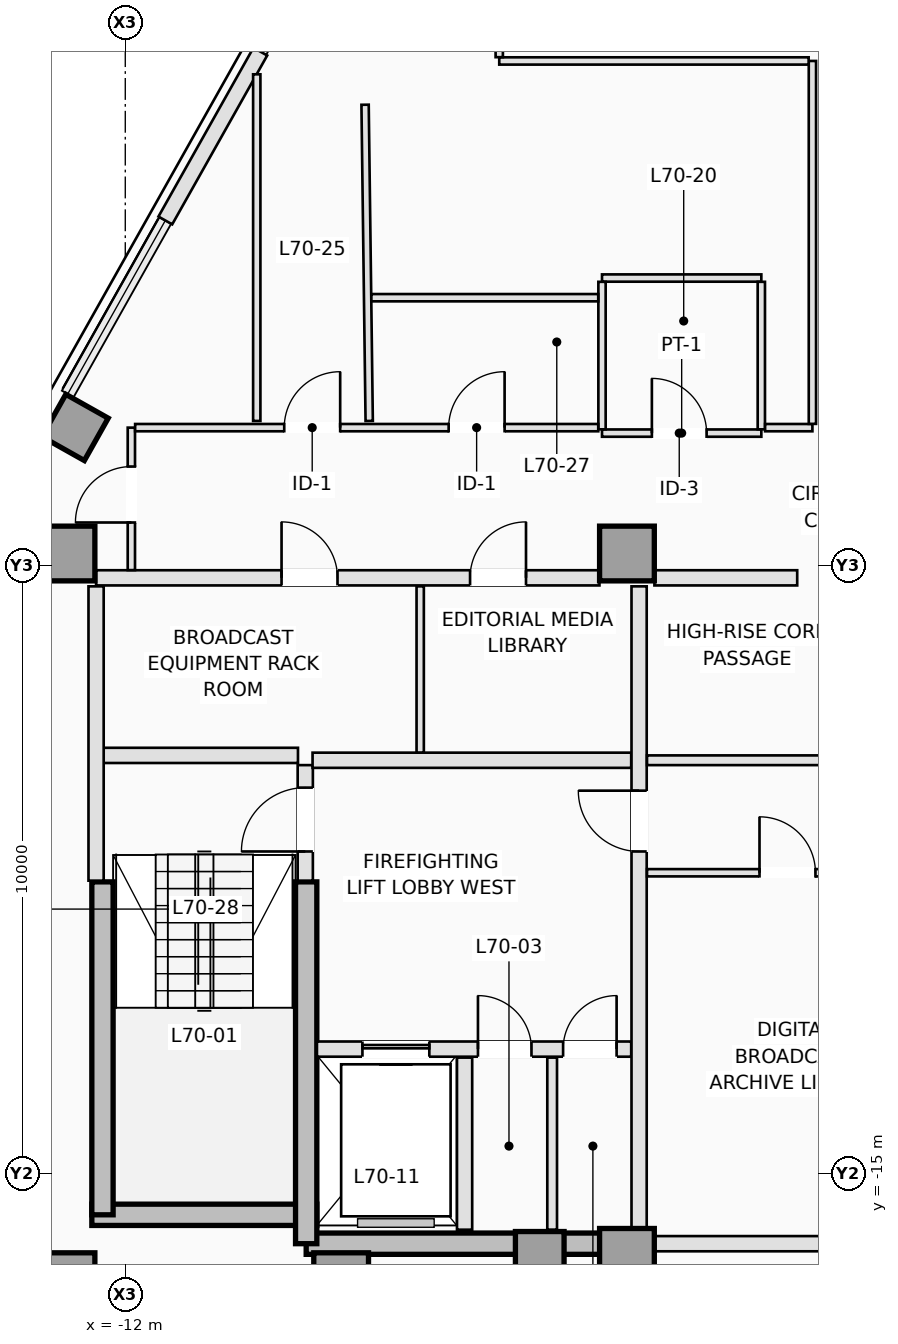
"""IFC4 building model, lengths in metres.
Left out: names, types, materials, properties, quantities, classifications, styles, units other than length and angle.
Written with IfcOpenShell. Run it as: python <this file> out.ifc"""

import sys

from ifc_helpers import new_model, si_unit, direction, frame, frame_2d, origin, origin_2d, place, context, subcontext, project, spatial, rectangle, extrude, element, fill, save


model = new_model("IFC4")
c1 = context("Model", 3, precision=1e-05, world=origin(), true_north=direction((0.0, 1.0)))
c2 = subcontext(c1, "Body", "Model", "MODEL_VIEW")
j1 = project(units=[si_unit("LENGTHUNIT", "METRE"), si_unit("PLANEANGLEUNIT", "RADIAN")], contexts=[c1])
p1 = place(None, origin())
s1 = spatial("IfcSite", under=j1, at=p1, CompositionType="ELEMENT")
p2 = place(p1, origin())
s2 = spatial("IfcBuilding", under=s1, at=p2, CompositionType="ELEMENT")
p3 = place(p2, frame((0.0, 0.0, 253.4)))
s3 = spatial("IfcBuildingStorey", under=s2, at=p3, CompositionType="ELEMENT", Elevation=253.4)
p4 = place(p3, frame((-12.55, -15.675, 0.0), z_axis=(0.0, 0.0, 1.0), x_axis=(1.0, 0.0, 0.0)))
e1 = element("IfcWall", 1, at=p4, inside=s3, PredefinedType="SHEAR", context=c2, shape_type="SweptSolid", body=[
    extrude(rectangle(XDim=3.7, YDim=0.35, at=frame_2d((1.85, 0.0))), origin(), (0.0, 0.0, 1.0), 3.5),
])
p5 = place(p3, frame((-9.025, -16.15, 0.0), z_axis=(0.0, 0.0, 1.0), x_axis=(1.0, 0.0, 0.0)))
e2 = element("IfcWall", 2, at=p5, inside=s3, PredefinedType="SHEAR", context=c2, shape_type="SweptSolid", body=[
    extrude(rectangle(XDim=5.275, YDim=0.35, at=frame_2d((2.637, 0.0))), origin(), (0.0, 0.0, 1.0), 3.5),
])
p6 = place(p3, frame((-12.375, -15.675, 0.0), z_axis=(0.0, 0.0, 1.0), x_axis=(0.0, 1.0, 0.0)))
e3 = element("IfcWall", 3, at=p6, inside=s3, PredefinedType="SHEAR", context=c2, shape_type="SweptSolid", body=[
    extrude(rectangle(XDim=5.475, YDim=0.35, at=frame_2d((2.738, 0.0))), origin(), (0.0, 0.0, 1.0), 3.5),
])
p7 = place(p3, frame((-9.025, -16.15, 0.0), z_axis=(0.0, 0.0, 1.0), x_axis=(0.0, 1.0, 0.0)))
e4 = element("IfcWall", 4, at=p7, inside=s3, PredefinedType="SHEAR", context=c2, shape_type="SweptSolid", body=[
    extrude(rectangle(XDim=5.95, YDim=0.35, at=frame_2d((2.975, 0.0))), origin(), (0.0, 0.0, 1.0), 3.5),
])
for number, where, z_axis, x_axis in (
    (5, (-12.95, -16.75, 0.0), (0.0, 0.0, 1.0), (1.0, 0.0, 0.0)),
    (6, (-8.45, -16.75, 0.0), (0.0, 0.0, 1.0), (1.0, 0.0, 0.0)),
    (7, (-3.75, -16.35, 0.0), (0.0, 0.0, 1.0), (1.0, 0.0, 0.0)),
    (8, (-12.95, -4.8, 0.0), (0.0, 0.0, 1.0), (1.0, 0.0, 0.0)),
    (9, (-3.75, -4.8, 0.0), (0.0, 0.0, 1.0), (1.0, 0.0, 0.0)),
):
    element("IfcColumn", number, at=place(p3, frame(where, z_axis=z_axis, x_axis=x_axis)), inside=s3, PredefinedType="COLUMN", context=c2, shape_type="SweptSolid", body=[
        extrude(rectangle(XDim=0.9, YDim=0.9, at=origin_2d()), origin(), (0.0, 0.0, 1.0), 3.5),
    ])
for number, where, z_axis, x_axis in (
    (10, (-5.184, -16.35, 0.0), (0.0, 0.0, 1.0), (0.0, 1.0, 0.0)),
    (11, (-12.825, -2.727, 0.0), (0.0, 0.0, 1.0), (-0.872, 0.49, 0.0)),
):
    element("IfcColumn", number, at=place(p3, frame(where, z_axis=z_axis, x_axis=x_axis)), inside=s3, PredefinedType="COLUMN", context=c2, shape_type="SweptSolid", body=[
        extrude(rectangle(XDim=0.8, YDim=0.8, at=origin_2d()), origin(), (0.0, 0.0, 1.0), 3.5),
    ])
p8 = place(p3, frame((-11.341, 0.677, 0.0), z_axis=(0.0, 0.0, 1.0), x_axis=(0.490268515903, 0.871571444182, 0.0)))
e12 = element("IfcWall", 12, at=p8, inside=s3, PredefinedType="STANDARD", context=c2, shape_type="SweptSolid", body=[
    extrude(rectangle(XDim=3.186, YDim=0.26, at=frame_2d((1.593, 0.0))), origin(), (0.0, 0.0, 1.0), 3.25),
])
p9 = place(p3, frame((-9.04, -10.18, 0.0), z_axis=(0.0, 0.0, 1.0), x_axis=(0.0, 1.0, 0.0)))
e13 = element("IfcWall", 13, at=p9, inside=s3, PredefinedType="PARTITIONING", context=c2, shape_type="SweptSolid", body=[
    extrude(rectangle(XDim=1.9, YDim=0.25, at=frame_2d((0.95, 0.0))), origin(), (0.0, 0.0, 1.0), 3.25),
])
p10 = place(p9, frame((0.48, 0.0, 0.0)))
e14 = element("IfcOpeningElement", 14, at=p10, cuts=e13, PredefinedType="OPENING", context=c2, shape_type="SweptSolid", body=[
    extrude(rectangle(XDim=1.05, YDim=2.15, at=frame_2d((0.525, 1.075))), frame((0.0, 0.135, 0.0), z_axis=(0.0, -1.0, 0.0), x_axis=(1.0, 0.0, 0.0)), (0.0, 0.0, 1.0), 0.27),
])
p11 = place(p3, frame((-12.38, -8.12, 0.0), z_axis=(0.0, 0.0, 1.0), x_axis=(1.0, 0.0, 0.0)))
e15 = element("IfcWall", 15, at=p11, inside=s3, PredefinedType="PARTITIONING", context=c2, shape_type="SweptSolid", body=[
    extrude(rectangle(XDim=3.22, YDim=0.25, at=frame_2d((1.61, 0.0))), origin(), (0.0, 0.0, 1.0), 3.25),
])
p12 = place(p3, frame((-12.48, -10.18, 0.0), z_axis=(0.0, 0.0, 1.0), x_axis=(0.0, 1.0, 0.0)))
e16 = element("IfcWall", 16, at=p12, inside=s3, PredefinedType="PARTITIONING", context=c2, shape_type="SweptSolid", body=[
    extrude(rectangle(XDim=4.84, YDim=0.25, at=frame_2d((2.42, 0.0))), origin(), (0.0, 0.0, 1.0), 3.25),
])
p13 = place(p3, frame((-8.848, -12.95, 0.0), z_axis=(0.0, 0.0, 1.0), x_axis=(1.0, 0.0, 0.0)))
e17 = element("IfcWall", 17, at=p13, inside=s3, PredefinedType="PARTITIONING", context=c2, shape_type="SweptSolid", body=[
    extrude(rectangle(XDim=5.168, YDim=0.25, at=frame_2d((2.584, 0.0))), origin(), (0.0, 0.0, 1.0), 3.25),
])
p14 = place(p13, frame((0.748, 0.0, 0.0)))
e18 = element("IfcOpeningElement", 18, at=p14, cuts=e17, PredefinedType="OPENING", context=c2, shape_type="SweptSolid", body=[
    extrude(rectangle(XDim=1.1, YDim=2.15, at=frame_2d((0.55, 1.075))), frame((0.0, 0.135, 0.0), z_axis=(0.0, -1.0, 0.0), x_axis=(1.0, 0.0, 0.0)), (0.0, 0.0, 1.0), 0.27),
])
p15 = place(p13, frame((2.648, 0.0, 0.0)))
e19 = element("IfcOpeningElement", 19, at=p15, cuts=e17, PredefinedType="OPENING", context=c2, shape_type="SweptSolid", body=[
    extrude(rectangle(XDim=0.88, YDim=2.1, at=frame_2d((0.44, 1.05))), frame((0.0, 0.135, 0.0), z_axis=(0.0, -1.0, 0.0), x_axis=(1.0, 0.0, 0.0)), (0.0, 0.0, 1.0), 0.27),
])
p16 = place(p13, frame((4.048, 0.0, 0.0)))
e20 = element("IfcOpeningElement", 20, at=p16, cuts=e17, PredefinedType="OPENING", context=c2, shape_type="SweptSolid", body=[
    extrude(rectangle(XDim=0.88, YDim=2.1, at=frame_2d((0.44, 1.05))), frame((0.0, 0.135, 0.0), z_axis=(0.0, -1.0, 0.0), x_axis=(1.0, 0.0, 0.0)), (0.0, 0.0, 1.0), 0.27),
])
p17 = place(p3, frame((-6.42, -15.92, 0.0), z_axis=(0.0, 0.0, 1.0), x_axis=(0.0, 1.0, 0.0)))
e21 = element("IfcWall", 21, at=p17, inside=s3, PredefinedType="PARTITIONING", context=c2, shape_type="SweptSolid", body=[
    extrude(rectangle(XDim=2.83, YDim=0.25, at=frame_2d((1.415, 0.0))), origin(), (0.0, 0.0, 1.0), 3.25),
])
p18 = place(p3, frame((-4.98, -15.92, 0.0), z_axis=(0.0, 0.0, 1.0), x_axis=(0.0, 1.0, 0.0)))
e22 = element("IfcWall", 22, at=p18, inside=s3, PredefinedType="PARTITIONING", context=c2, shape_type="SweptSolid", body=[
    extrude(rectangle(XDim=2.83, YDim=0.16, at=frame_2d((1.415, 0.0))), origin(), (0.0, 0.0, 1.0), 3.25),
])
p19 = place(p3, frame((-8.92, -8.2, 0.0), z_axis=(0.0, 0.0, 1.0), x_axis=(1.0, 0.0, 0.0)))
e23 = element("IfcWall", 23, at=p19, inside=s3, PredefinedType="PARTITIONING", context=c2, shape_type="SweptSolid", body=[
    extrude(rectangle(XDim=5.24, YDim=0.25, at=frame_2d((2.62, 0.0))), origin(), (0.0, 0.0, 1.0), 3.25),
])
p20 = place(p3, frame((-3.55, -15.898, 0.0), z_axis=(0.0, 0.0, 1.0), x_axis=(0.0, 1.0, 0.0)))
e24 = element("IfcWall", 24, at=p20, inside=s3, PredefinedType="PARTITIONING", context=c2, shape_type="SweptSolid", body=[
    extrude(rectangle(XDim=10.558, YDim=0.25, at=frame_2d((5.279, 0.0))), origin(), (0.0, 0.0, 1.0), 3.25),
])
p21 = place(p20, frame((6.198, 0.0, 0.0)))
e25 = element("IfcOpeningElement", 25, at=p21, cuts=e24, PredefinedType="OPENING", context=c2, shape_type="SweptSolid", body=[
    extrude(rectangle(XDim=1.0, YDim=2.15, at=frame_2d((0.5, 1.075))), frame((0.0, 0.135, 0.0), z_axis=(0.0, -1.0, 0.0), x_axis=(1.0, 0.0, 0.0)), (0.0, 0.0, 1.0), 0.27),
])
p22 = place(p3, frame((-12.48, -5.2, 0.0), z_axis=(0.0, 0.0, 1.0), x_axis=(1.0, 0.0, 0.0)))
e26 = element("IfcWall", 26, at=p22, inside=s3, PredefinedType="PARTITIONING", context=c2, shape_type="SweptSolid", body=[
    extrude(rectangle(XDim=8.278, YDim=0.25, at=frame_2d((4.139, 0.0))), origin(), (0.0, 0.0, 1.0), 3.25),
])
p23 = place(p22, frame((3.05, 0.0, 0.0)))
e27 = element("IfcOpeningElement", 27, at=p23, cuts=e26, PredefinedType="OPENING", context=c2, shape_type="SweptSolid", body=[
    extrude(rectangle(XDim=0.92, YDim=2.12, at=frame_2d((0.46, 1.06))), frame((0.0, 0.135, 0.0), z_axis=(0.0, -1.0, 0.0), x_axis=(1.0, 0.0, 0.0)), (0.0, 0.0, 1.0), 0.27),
])
p24 = place(p22, frame((6.15, 0.0, 0.0)))
e28 = element("IfcOpeningElement", 28, at=p24, cuts=e26, PredefinedType="OPENING", context=c2, shape_type="SweptSolid", body=[
    extrude(rectangle(XDim=0.92, YDim=2.12, at=frame_2d((0.46, 1.06))), frame((0.0, 0.135, 0.0), z_axis=(0.0, -1.0, 0.0), x_axis=(1.0, 0.0, 0.0)), (0.0, 0.0, 1.0), 0.27),
])
p25 = place(p3, frame((-3.298, -5.2, 0.0), z_axis=(0.0, 0.0, 1.0), x_axis=(1.0, 0.0, 0.0)))
e29 = element("IfcWall", 29, at=p25, inside=s3, PredefinedType="PARTITIONING", context=c2, shape_type="SweptSolid", body=[
    extrude(rectangle(XDim=2.348, YDim=0.25, at=frame_2d((1.174, 0.0))), origin(), (0.0, 0.0, 1.0), 3.25),
])
p26 = place(p3, frame((-7.15, -8.073, 0.0), z_axis=(0.0, 0.0, 1.0), x_axis=(0.0, 1.0, 0.0)))
e30 = element("IfcWall", 30, at=p26, inside=s3, PredefinedType="PARTITIONING", context=c2, shape_type="SweptSolid", body=[
    extrude(rectangle(XDim=2.733, YDim=0.12, at=frame_2d((1.366, 0.0))), origin(), (0.0, 0.0, 1.0), 3.25),
])
p27 = place(p3, frame((-3.298, -16.15, 0.0), z_axis=(0.0, 0.0, 1.0), x_axis=(1.0, 0.0, 0.0)))
e31 = element("IfcWall", 31, at=p27, inside=s3, PredefinedType="PARTITIONING", context=c2, shape_type="SweptSolid", body=[
    extrude(rectangle(XDim=6.596, YDim=0.25, at=frame_2d((3.298, 0.0))), origin(), (0.0, 0.0, 1.0), 2.844),
])
p28 = place(p3, frame((-3.42, -8.2, 0.0), z_axis=(0.0, 0.0, 1.0), x_axis=(1.0, 0.0, 0.0)))
e32 = element("IfcWall", 32, at=p28, inside=s3, PredefinedType="PARTITIONING", context=c2, shape_type="SweptSolid", body=[
    extrude(rectangle(XDim=6.84, YDim=0.16, at=frame_2d((3.42, 0.0))), origin(), (0.0, 0.0, 1.0), 3.25),
])
p29 = place(p28, frame((2.92, 0.0, 0.0)))
e33 = element("IfcOpeningElement", 33, at=p29, cuts=e32, PredefinedType="OPENING", context=c2, shape_type="SweptSolid", body=[
    extrude(rectangle(XDim=1.0, YDim=2.15, at=frame_2d((0.5, 1.075))), frame((0.0, 0.09, 0.0), z_axis=(0.0, -1.0, 0.0), x_axis=(1.0, 0.0, 0.0)), (0.0, 0.0, 1.0), 0.18),
])
p30 = place(p3, frame((-3.42, -10.05, 0.0), z_axis=(0.0, 0.0, 1.0), x_axis=(1.0, 0.0, 0.0)))
e34 = element("IfcWall", 34, at=p30, inside=s3, PredefinedType="PARTITIONING", context=c2, shape_type="SweptSolid", body=[
    extrude(rectangle(XDim=6.84, YDim=0.12, at=frame_2d((3.42, 0.0))), origin(), (0.0, 0.0, 1.0), 3.25),
])
p31 = place(p30, frame((1.85, 0.0, 0.0)))
e35 = element("IfcOpeningElement", 35, at=p31, cuts=e34, PredefinedType="OPENING", context=c2, shape_type="SweptSolid", body=[
    extrude(rectangle(XDim=0.92, YDim=2.12, at=frame_2d((0.46, 1.06))), frame((0.0, 0.07, 0.0), z_axis=(0.0, -1.0, 0.0), x_axis=(1.0, 0.0, 0.0)), (0.0, 0.0, 1.0), 0.14),
])
p32 = place(p30, frame((5.35, 0.0, 0.0)))
e36 = element("IfcOpeningElement", 36, at=p32, cuts=e34, PredefinedType="OPENING", context=c2, shape_type="SweptSolid", body=[
    extrude(rectangle(XDim=0.88, YDim=2.12, at=frame_2d((0.44, 1.06))), frame((0.0, 0.07, 0.0), z_axis=(0.0, -1.0, 0.0), x_axis=(1.0, 0.0, 0.0)), (0.0, 0.0, 1.0), 0.14),
])
p33 = place(p3, frame((-4.16, -2.82, 0.0), z_axis=(0.0, 0.0, 1.0), x_axis=(1.0, 0.0, 0.0)))
e37 = element("IfcWall", 37, at=p33, inside=s3, PredefinedType="PARTITIONING", context=c2, shape_type="SweptSolid", body=[
    extrude(rectangle(XDim=2.62, YDim=0.12, at=frame_2d((1.31, 0.0))), origin(), (0.0, 0.0, 1.0), 2.943),
])
p34 = place(p33, frame((0.82, 0.0, 0.0)))
e38 = element("IfcOpeningElement", 38, at=p34, cuts=e37, PredefinedType="OPENING", context=c2, shape_type="SweptSolid", body=[
    extrude(rectangle(XDim=0.9, YDim=2.12, at=frame_2d((0.45, 1.06))), frame((0.0, 0.07, 0.0), z_axis=(0.0, -1.0, 0.0), x_axis=(1.0, 0.0, 0.0)), (0.0, 0.0, 1.0), 0.14),
])
p35 = place(p3, frame((-4.16, -0.27, 0.0), z_axis=(0.0, 0.0, 1.0), x_axis=(1.0, 0.0, 0.0)))
e39 = element("IfcWall", 39, at=p35, inside=s3, PredefinedType="PARTITIONING", context=c2, shape_type="SweptSolid", body=[
    extrude(rectangle(XDim=2.62, YDim=0.12, at=frame_2d((1.31, 0.0))), origin(), (0.0, 0.0, 1.0), 3.25),
])
for number, where, z_axis, x_axis in (
    (40, (-4.16, -2.758, 0.0), (0.0, 0.0, 1.0), (0.0, 1.0, 0.0)),
    (41, (-1.54, -2.758, 0.0), (0.0, 0.0, 1.0), (0.0, 1.0, 0.0)),
):
    element("IfcWall", number, at=place(p3, frame(where, z_axis=z_axis, x_axis=x_axis)), inside=s3, PredefinedType="PARTITIONING", context=c2, shape_type="SweptSolid", body=[
        extrude(rectangle(XDim=2.426, YDim=0.12, at=frame_2d((1.213, 0.0))), origin(), (0.0, 0.0, 1.0), 3.25),
    ])
p36 = place(p3, frame((-11.9, -5.073, 0.0), z_axis=(0.0, 0.0, 1.0), x_axis=(0.0, 1.0, 0.0)))
e42 = element("IfcWall", 42, at=p36, inside=s3, PredefinedType="PARTITIONING", context=c2, shape_type="SweptSolid", body=[
    extrude(rectangle(XDim=2.343, YDim=0.12, at=frame_2d((1.171, 0.0))), origin(), (0.0, 0.0, 1.0), 3.25),
])
p37 = place(p36, frame((0.783, 0.0, 0.0)))
e43 = element("IfcOpeningElement", 43, at=p37, cuts=e42, PredefinedType="OPENING", context=c2, shape_type="SweptSolid", body=[
    extrude(rectangle(XDim=0.92, YDim=2.12, at=frame_2d((0.46, 1.06))), frame((0.0, 0.07, 0.0), z_axis=(0.0, -1.0, 0.0), x_axis=(1.0, 0.0, 0.0)), (0.0, 0.0, 1.0), 0.14),
])
p38 = place(p3, frame((-11.838, -2.73, 0.0), z_axis=(0.0, 0.0, 1.0), x_axis=(1.0, 0.0, 0.0)))
e44 = element("IfcWall", 44, at=p38, inside=s3, PredefinedType="PARTITIONING", context=c2, shape_type="SweptSolid", body=[
    extrude(rectangle(XDim=7.616, YDim=0.12, at=frame_2d((3.808, 0.0))), origin(), (0.0, 0.0, 1.0), 3.25),
])
p39 = place(p38, frame((2.452, 0.0, 0.0)))
e45 = element("IfcOpeningElement", 45, at=p39, cuts=e44, PredefinedType="OPENING", context=c2, shape_type="SweptSolid", body=[
    extrude(rectangle(XDim=0.92, YDim=2.12, at=frame_2d((0.46, 1.06))), frame((0.0, 0.07, 0.0), z_axis=(0.0, -1.0, 0.0), x_axis=(1.0, 0.0, 0.0)), (0.0, 0.0, 1.0), 0.14),
])
p40 = place(p38, frame((5.156, 0.0, 0.0)))
e46 = element("IfcOpeningElement", 46, at=p40, cuts=e44, PredefinedType="OPENING", context=c2, shape_type="SweptSolid", body=[
    extrude(rectangle(XDim=0.92, YDim=2.12, at=frame_2d((0.46, 1.06))), frame((0.0, 0.07, 0.0), z_axis=(0.0, -1.0, 0.0), x_axis=(1.0, 0.0, 0.0)), (0.0, 0.0, 1.0), 0.14),
])
p41 = place(p3, frame((-1.478, -2.73, 0.0), z_axis=(0.0, 0.0, 1.0), x_axis=(1.0, 0.0, 0.0)))
e47 = element("IfcWall", 47, at=p41, inside=s3, PredefinedType="PARTITIONING", context=c2, shape_type="SweptSolid", body=[
    extrude(rectangle(XDim=0.778, YDim=0.12, at=frame_2d((0.389, 0.0))), origin(), (0.0, 0.0, 1.0), 2.943),
])
p42 = place(p3, frame((-0.7, -2.668, 0.0), z_axis=(0.0, 0.0, 1.0), x_axis=(0.0, 1.0, 0.0)))
e48 = element("IfcWall", 48, at=p42, inside=s3, PredefinedType="PARTITIONING", context=c2, shape_type="SweptSolid", body=[
    extrude(rectangle(XDim=5.968, YDim=0.12, at=frame_2d((2.984, 0.0))), origin(), (0.0, 0.0, 1.0), 3.25),
])
p43 = place(p3, frame((-0.762, 3.3, 0.0), z_axis=(0.0, 0.0, 1.0), x_axis=(-1.0, 0.0, 0.0)))
e49 = element("IfcWall", 49, at=p43, inside=s3, PredefinedType="PARTITIONING", context=c2, shape_type="SweptSolid", body=[
    extrude(rectangle(XDim=5.088, YDim=0.12, at=frame_2d((2.544, 0.0))), origin(), (0.0, 0.0, 1.0), 3.25),
])
p44 = place(p3, frame((-5.85, 3.362, 0.0), z_axis=(0.0, 0.0, 1.0), x_axis=(0.0, 1.0, 0.0)))
e50 = element("IfcWall", 50, at=p44, inside=s3, PredefinedType="PARTITIONING", context=c2, shape_type="SweptSolid", body=[
    extrude(rectangle(XDim=1.488, YDim=0.12, at=frame_2d((0.744, 0.0))), origin(), (0.0, 0.0, 1.0), 3.25),
])
p45 = place(p3, frame((-7.989, -2.62, 0.0), z_axis=(0.0, 0.0, 1.0), x_axis=(-0.013050531691, 0.999914838185, 0.0)))
e51 = element("IfcWall", 51, at=p45, inside=s3, PredefinedType="PARTITIONING", context=c2, shape_type="SweptSolid", body=[
    extrude(rectangle(XDim=5.201, YDim=0.12, at=frame_2d((2.6, 0.0))), origin(), (0.0, 0.0, 1.0), 3.25),
])
p46 = place(p3, frame((-4.222, -0.593, 0.0), z_axis=(0.0, 0.0, 1.0), x_axis=(-1.0, 0.0, 0.0)))
e52 = element("IfcWall", 52, at=p46, inside=s3, PredefinedType="PARTITIONING", context=c2, shape_type="SweptSolid", body=[
    extrude(rectangle(XDim=3.731, YDim=0.12, at=frame_2d((1.865, 0.0))), origin(), (0.0, 0.0, 1.0), 3.25),
])
p47 = place(p3, frame((-9.838, -2.62, 0.0), z_axis=(0.0, 0.0, 1.0), x_axis=(0.0, 1.0, 0.0)))
e53 = element("IfcWall", 53, at=p47, inside=s3, PredefinedType="PARTITIONING", context=c2, shape_type="SweptSolid", body=[
    extrude(rectangle(XDim=5.7, YDim=0.12, at=frame_2d((2.85, 0.0))), origin(), (0.0, 0.0, 1.0), 3.25),
])
p48 = place(p14, origin())
e54 = element("IfcDoor", 54, at=p48, inside=s3, OperationType="SLIDING_TO_LEFT", PredefinedType="DOOR", context=c2, shape_type="SweptSolid", body=[
    extrude(rectangle(XDim=1.1, YDim=2.15, at=frame_2d((0.55, 1.075))), frame((0.0, 0.025, 0.0), z_axis=(0.0, -1.0, 0.0), x_axis=(1.0, 0.0, 0.0)), (0.0, 0.0, 1.0), 0.05),
])
fill(e18, e54)
p49 = place(p10, origin())
e55 = element("IfcDoor", 55, at=p49, inside=s3, OperationType="SINGLE_SWING_LEFT", PredefinedType="DOOR", context=c2, shape_type="SweptSolid", body=[
    extrude(rectangle(XDim=1.05, YDim=2.15, at=frame_2d((0.525, 1.075))), frame((0.0, 0.025, 0.0), z_axis=(0.0, -1.0, 0.0), x_axis=(1.0, 0.0, 0.0)), (0.0, 0.0, 1.0), 0.05),
])
fill(e14, e55)
p50 = place(p15, origin())
e56 = element("IfcDoor", 56, at=p50, inside=s3, OperationType="SINGLE_SWING_LEFT", PredefinedType="TRAPDOOR", context=c2, shape_type="SweptSolid", body=[
    extrude(rectangle(XDim=0.88, YDim=2.1, at=frame_2d((0.44, 1.05))), frame((0.0, 0.025, 0.0), z_axis=(0.0, -1.0, 0.0), x_axis=(1.0, 0.0, 0.0)), (0.0, 0.0, 1.0), 0.05),
])
fill(e19, e56)
p51 = place(p16, origin())
e57 = element("IfcDoor", 57, at=p51, inside=s3, OperationType="SINGLE_SWING_RIGHT", PredefinedType="TRAPDOOR", context=c2, shape_type="SweptSolid", body=[
    extrude(rectangle(XDim=0.88, YDim=2.1, at=frame_2d((0.44, 1.05))), frame((0.0, 0.025, 0.0), z_axis=(0.0, -1.0, 0.0), x_axis=(1.0, 0.0, 0.0)), (0.0, 0.0, 1.0), 0.05),
])
fill(e20, e57)
p52 = place(p21, origin())
e58 = element("IfcDoor", 58, at=p52, inside=s3, OperationType="SINGLE_SWING_RIGHT", PredefinedType="DOOR", context=c2, shape_type="SweptSolid", body=[
    extrude(rectangle(XDim=1.0, YDim=2.15, at=frame_2d((0.5, 1.075))), frame((0.0, 0.025, 0.0), z_axis=(0.0, -1.0, 0.0), x_axis=(1.0, 0.0, 0.0)), (0.0, 0.0, 1.0), 0.05),
])
fill(e25, e58)
p53 = place(p23, origin())
e59 = element("IfcDoor", 59, at=p53, inside=s3, OperationType="SINGLE_SWING_LEFT", PredefinedType="DOOR", context=c2, shape_type="SweptSolid", body=[
    extrude(rectangle(XDim=0.92, YDim=2.12, at=frame_2d((0.46, 1.06))), frame((0.0, 0.025, 0.0), z_axis=(0.0, -1.0, 0.0), x_axis=(1.0, 0.0, 0.0)), (0.0, 0.0, 1.0), 0.05),
])
fill(e27, e59)
p54 = place(p24, origin())
e60 = element("IfcDoor", 60, at=p54, inside=s3, OperationType="SINGLE_SWING_RIGHT", PredefinedType="DOOR", context=c2, shape_type="SweptSolid", body=[
    extrude(rectangle(XDim=0.92, YDim=2.12, at=frame_2d((0.46, 1.06))), frame((0.0, 0.025, 0.0), z_axis=(0.0, -1.0, 0.0), x_axis=(1.0, 0.0, 0.0)), (0.0, 0.0, 1.0), 0.05),
])
fill(e28, e60)
p55 = place(p31, origin())
e61 = element("IfcDoor", 61, at=p55, inside=s3, OperationType="SINGLE_SWING_LEFT", PredefinedType="DOOR", context=c2, shape_type="SweptSolid", body=[
    extrude(rectangle(XDim=0.92, YDim=2.12, at=frame_2d((0.46, 1.06))), frame((0.0, 0.025, 0.0), z_axis=(0.0, -1.0, 0.0), x_axis=(1.0, 0.0, 0.0)), (0.0, 0.0, 1.0), 0.05),
])
fill(e35, e61)
p56 = place(p34, origin())
e62 = element("IfcDoor", 62, at=p56, inside=s3, OperationType="SINGLE_SWING_LEFT", PredefinedType="DOOR", context=c2, shape_type="SweptSolid", body=[
    extrude(rectangle(XDim=0.9, YDim=2.12, at=frame_2d((0.45, 1.06))), frame((0.0, 0.025, 0.0), z_axis=(0.0, -1.0, 0.0), x_axis=(1.0, 0.0, 0.0)), (0.0, 0.0, 1.0), 0.05),
])
fill(e38, e62)
p57 = place(p39, origin())
e63 = element("IfcDoor", 63, at=p57, inside=s3, OperationType="SINGLE_SWING_RIGHT", PredefinedType="DOOR", context=c2, shape_type="SweptSolid", body=[
    extrude(rectangle(XDim=0.92, YDim=2.12, at=frame_2d((0.46, 1.06))), frame((0.0, 0.025, 0.0), z_axis=(0.0, -1.0, 0.0), x_axis=(1.0, 0.0, 0.0)), (0.0, 0.0, 1.0), 0.05),
])
fill(e45, e63)
p58 = place(p40, origin())
e64 = element("IfcDoor", 64, at=p58, inside=s3, OperationType="SINGLE_SWING_RIGHT", PredefinedType="DOOR", context=c2, shape_type="SweptSolid", body=[
    extrude(rectangle(XDim=0.92, YDim=2.12, at=frame_2d((0.46, 1.06))), frame((0.0, 0.025, 0.0), z_axis=(0.0, -1.0, 0.0), x_axis=(1.0, 0.0, 0.0)), (0.0, 0.0, 1.0), 0.05),
])
fill(e46, e64)
p59 = place(p37, origin())
e65 = element("IfcDoor", 65, at=p59, inside=s3, OperationType="SINGLE_SWING_LEFT", PredefinedType="DOOR", context=c2, shape_type="SweptSolid", body=[
    extrude(rectangle(XDim=0.92, YDim=2.12, at=frame_2d((0.46, 1.06))), frame((0.0, 0.025, 0.0), z_axis=(0.0, -1.0, 0.0), x_axis=(1.0, 0.0, 0.0)), (0.0, 0.0, 1.0), 0.05),
])
fill(e43, e65)
save(model, sys.argv[1])
